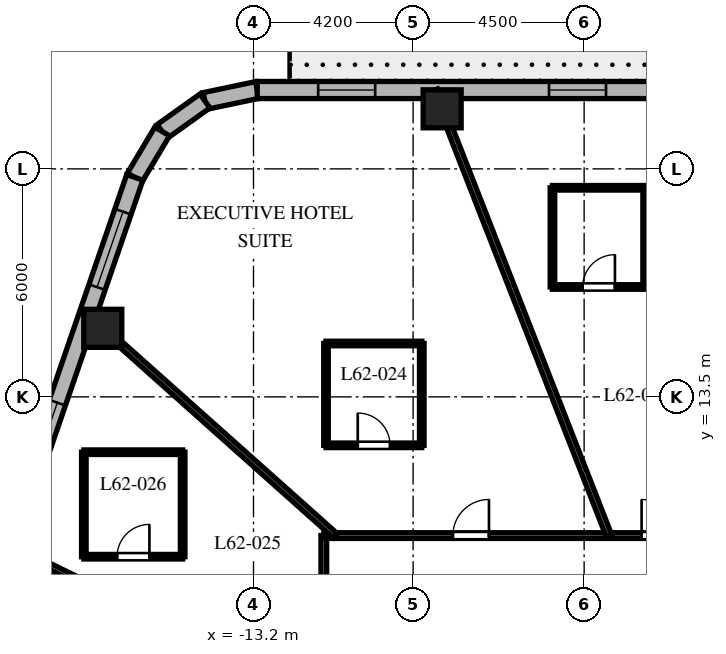
"""IFC4 building model, lengths in metres.
Left out: names, types, materials, properties, quantities, classifications, styles, units other than length and angle.
Written with IfcOpenShell. Run it as: python <this file> out.ifc"""

import sys

from ifc_helpers import new_model, si_unit, direction, frame, frame_2d, origin, origin_2d, place, context, subcontext, project, spatial, rectangle, extrude, element, fill, save


model = new_model("IFC4")
c1 = context("Model", 3, precision=1e-05, world=origin(), true_north=direction((0.0, 1.0)))
c2 = subcontext(c1, "Body", "Model", "MODEL_VIEW")
j1 = project(units=[si_unit("LENGTHUNIT", "METRE"), si_unit("PLANEANGLEUNIT", "RADIAN")], contexts=[c1])
p1 = place(None, origin())
s1 = spatial("IfcSite", under=j1, at=p1, CompositionType="ELEMENT")
p2 = place(p1, origin())
s2 = spatial("IfcBuilding", under=s1, at=p2, CompositionType="ELEMENT")
p3 = place(p2, frame((0.0, 0.0, 248.3)))
s3 = spatial("IfcBuildingStorey", under=s2, at=p3, CompositionType="ELEMENT", Elevation=248.3)
for number, where, z_axis, x_axis in (
    (1, (-8.236, 21.08, 0.0), (0.0, 0.0, 1.0), (1.0, 0.0, 0.0)),
    (2, (-17.166, 15.304, 0.0), (0.0, 0.0, 1.0), (1.0, 0.0, 0.0)),
):
    element("IfcColumn", number, at=place(p3, frame(where, z_axis=z_axis, x_axis=x_axis)), inside=s3, PredefinedType="COLUMN", context=c2, shape_type="SweptSolid", body=[
        extrude(rectangle(XDim=1.0, YDim=1.0, at=origin_2d()), origin(), (0.0, 0.0, 1.0), 3.8),
    ])
p4 = place(p3, frame((-13.102, 21.575, 0.0), z_axis=(0.0, 0.0, 1.0), x_axis=(-0.978757421505, -0.205021730188, 0.0)))
e3 = element("IfcWall", 3, at=p4, inside=s3, PredefinedType="SOLIDWALL", context=c2, shape_type="SweptSolid", body=[
    extrude(rectangle(XDim=1.406, YDim=0.45, at=frame_2d((0.703, 0.0))), origin(), (0.0, 0.0, 1.0), 3.5),
])
p5 = place(p3, frame((-14.478, 21.287, 0.0), z_axis=(0.0, 0.0, 1.0), x_axis=(-0.813888518617, -0.58102106611, 0.0)))
e4 = element("IfcWall", 4, at=p5, inside=s3, PredefinedType="SOLIDWALL", context=c2, shape_type="SweptSolid", body=[
    extrude(rectangle(XDim=1.383, YDim=0.45, at=frame_2d((0.691, 0.0))), origin(), (0.0, 0.0, 1.0), 3.5),
])
p6 = place(p3, frame((-15.604, 20.483, 0.0), z_axis=(0.0, 0.0, 1.0), x_axis=(-0.512222149036, -0.858852996756, 0.0)))
e5 = element("IfcWall", 5, at=p6, inside=s3, PredefinedType="SOLIDWALL", context=c2, shape_type="SweptSolid", body=[
    extrude(rectangle(XDim=1.406, YDim=0.45, at=frame_2d((0.703, 0.0))), origin(), (0.0, 0.0, 1.0), 3.5),
])
p7 = place(p3, frame((11.298, 21.575, 0.0), z_axis=(0.0, 0.0, 1.0), x_axis=(-1.0, 0.0, 0.0)))
e6 = element("IfcWall", 6, at=p7, inside=s3, PredefinedType="SOLIDWALL", context=c2, shape_type="SweptSolid", body=[
    extrude(rectangle(XDim=24.399, YDim=0.45, at=frame_2d((12.2, 0.0))), origin(), (0.0, 0.0, 1.0), 3.5),
])
p8 = place(p7, frame((2.55, 0.0, 0.0)))
e7 = element("IfcOpeningElement", 7, at=p8, cuts=e6, PredefinedType="OPENING", context=c2, shape_type="SweptSolid", body=[
    extrude(rectangle(XDim=0.95, YDim=2.15, at=frame_2d((0.475, 1.075))), frame((0.0, 0.235, 0.0), z_axis=(0.0, -1.0, 0.0), x_axis=(1.0, 0.0, 0.0)), (0.0, 0.0, 1.0), 0.47),
])
p9 = place(p7, frame((8.469, 0.0, 0.8)))
e8 = element("IfcOpeningElement", 8, at=p9, cuts=e6, PredefinedType="OPENING", context=c2, shape_type="SweptSolid", body=[
    extrude(rectangle(XDim=1.5, YDim=1.8, at=frame_2d((0.75, 0.9))), frame((0.0, 0.235, 0.0), z_axis=(0.0, -1.0, 0.0), x_axis=(1.0, 0.0, 0.0)), (0.0, 0.0, 1.0), 0.47),
])
p10 = place(p7, frame((15.222, 0.0, 0.8)))
e9 = element("IfcOpeningElement", 9, at=p10, cuts=e6, PredefinedType="OPENING", context=c2, shape_type="SweptSolid", body=[
    extrude(rectangle(XDim=1.5, YDim=1.8, at=frame_2d((0.75, 0.9))), frame((0.0, 0.235, 0.0), z_axis=(0.0, -1.0, 0.0), x_axis=(1.0, 0.0, 0.0)), (0.0, 0.0, 1.0), 0.47),
])
p11 = place(p7, frame((21.296, 0.0, 0.8)))
e10 = element("IfcOpeningElement", 10, at=p11, cuts=e6, PredefinedType="OPENING", context=c2, shape_type="SweptSolid", body=[
    extrude(rectangle(XDim=1.5, YDim=1.8, at=frame_2d((0.75, 0.9))), frame((0.0, 0.235, 0.0), z_axis=(0.0, -1.0, 0.0), x_axis=(1.0, 0.0, 0.0)), (0.0, 0.0, 1.0), 0.47),
])
p12 = place(p3, frame((-16.324, 19.275, 0.0), z_axis=(0.0, 0.0, 1.0), x_axis=(-0.325083142304, -0.945685439557, 0.0)))
e11 = element("IfcWall", 11, at=p12, inside=s3, PredefinedType="SOLIDWALL", context=c2, shape_type="SweptSolid", body=[
    extrude(rectangle(XDim=20.224, YDim=0.45, at=frame_2d((10.112, 0.0))), origin(), (0.0, 0.0, 1.0), 3.5),
])
p13 = place(p12, frame((0.953, 0.0, 0.8)))
e12 = element("IfcOpeningElement", 12, at=p13, cuts=e11, PredefinedType="OPENING", context=c2, shape_type="SweptSolid", body=[
    extrude(rectangle(XDim=2.1, YDim=1.85, at=frame_2d((1.05, 0.925))), frame((0.0, 0.235, 0.0), z_axis=(0.0, -1.0, 0.0), x_axis=(1.0, 0.0, 0.0)), (0.0, 0.0, 1.0), 0.47),
])
p14 = place(p12, frame((6.268, 0.0, 0.8)))
e13 = element("IfcOpeningElement", 13, at=p14, cuts=e11, PredefinedType="OPENING", context=c2, shape_type="SweptSolid", body=[
    extrude(rectangle(XDim=2.1, YDim=1.85, at=frame_2d((1.05, 0.925))), frame((0.0, 0.235, 0.0), z_axis=(0.0, -1.0, 0.0), x_axis=(1.0, 0.0, 0.0)), (0.0, 0.0, 1.0), 0.47),
])
p15 = place(p12, frame((11.95, 0.0, 0.8)))
e14 = element("IfcOpeningElement", 14, at=p15, cuts=e11, PredefinedType="OPENING", context=c2, shape_type="SweptSolid", body=[
    extrude(rectangle(XDim=2.1, YDim=1.85, at=frame_2d((1.05, 0.925))), frame((0.0, 0.235, 0.0), z_axis=(0.0, -1.0, 0.0), x_axis=(1.0, 0.0, 0.0)), (0.0, 0.0, 1.0), 0.47),
])
p16 = place(p12, frame((17.118, 0.0, 0.8)))
e15 = element("IfcOpeningElement", 15, at=p16, cuts=e11, PredefinedType="OPENING", context=c2, shape_type="SweptSolid", body=[
    extrude(rectangle(XDim=2.1, YDim=1.85, at=frame_2d((1.05, 0.925))), frame((0.0, 0.235, 0.0), z_axis=(0.0, -1.0, 0.0), x_axis=(1.0, 0.0, 0.0)), (0.0, 0.0, 1.0), 0.47),
])
p17 = place(p3, frame((-11.35, 4.4, 0.0), z_axis=(0.0, 0.0, 1.0), x_axis=(0.0, 1.0, 0.0)))
e16 = element("IfcWall", 16, at=p17, inside=s3, PredefinedType="PARTITIONING", context=c2, shape_type="SweptSolid", body=[
    extrude(rectangle(XDim=5.45, YDim=0.15, at=frame_2d((2.725, 0.0))), origin(), (0.0, 0.0, 1.0), 2.99),
])
p18 = place(p17, frame((2.694, 0.0, 0.0)))
e17 = element("IfcOpeningElement", 17, at=p18, cuts=e16, PredefinedType="OPENING", context=c2, shape_type="SweptSolid", body=[
    extrude(rectangle(XDim=0.95, YDim=2.03, at=frame_2d((0.475, 1.015))), frame((0.0, 0.085, 0.0), z_axis=(0.0, -1.0, 0.0), x_axis=(1.0, 0.0, 0.0)), (0.0, 0.0, 1.0), 0.17),
])
p19 = place(p3, frame((-11.35, 9.85, 0.0), z_axis=(0.0, 0.0, 1.0), x_axis=(1.0, 0.0, 0.0)))
e18 = element("IfcWall", 18, at=p19, inside=s3, PredefinedType="PARTITIONING", context=c2, shape_type="SweptSolid", body=[
    extrude(rectangle(XDim=10.43, YDim=0.15, at=frame_2d((5.215, 0.0))), origin(), (0.0, 0.0, 1.0), 2.99),
])
p20 = place(p19, frame((8.362, 0.0, 0.0)))
e19 = element("IfcOpeningElement", 19, at=p20, cuts=e18, PredefinedType="OPENING", context=c2, shape_type="SweptSolid", body=[
    extrude(rectangle(XDim=0.95, YDim=2.03, at=frame_2d((0.475, 1.015))), frame((0.0, 0.085, 0.0), z_axis=(0.0, -1.0, 0.0), x_axis=(1.0, 0.0, 0.0)), (0.0, 0.0, 1.0), 0.17),
])
p21 = place(p19, frame((3.396, 0.0, 0.0)))
e20 = element("IfcOpeningElement", 20, at=p21, cuts=e18, PredefinedType="OPENING", context=c2, shape_type="SweptSolid", body=[
    extrude(rectangle(XDim=0.95, YDim=2.03, at=frame_2d((0.475, 1.015))), frame((0.0, 0.085, 0.0), z_axis=(0.0, -1.0, 0.0), x_axis=(1.0, 0.0, 0.0)), (0.0, 0.0, 1.0), 0.17),
])
p22 = place(p3, frame((-3.848, 9.85, 0.0), z_axis=(0.0, 0.0, 1.0), x_axis=(-0.363921778212, 0.931429513889, 0.0)))
e21 = element("IfcWall", 21, at=p22, inside=s3, PredefinedType="PARTITIONING", context=c2, shape_type="SweptSolid", body=[
    extrude(rectangle(XDim=12.588, YDim=0.15, at=frame_2d((6.294, 0.0))), origin(), (0.0, 0.0, 1.0), 2.74),
])
p23 = place(p3, frame((-11.048, 9.85, 0.0), z_axis=(0.0, 0.0, 1.0), x_axis=(-0.746444434655, 0.665447748492, 0.0)))
e22 = element("IfcWall", 22, at=p23, inside=s3, PredefinedType="PARTITIONING", context=c2, shape_type="SweptSolid", body=[
    extrude(rectangle(XDim=8.732, YDim=0.15, at=frame_2d((4.366, 0.0))), origin(), (0.0, 0.0, 1.0), 2.74),
])
p24 = place(p3, frame((-11.35, 5.528, 0.0), z_axis=(0.0, 0.0, 1.0), x_axis=(-0.899038669565, 0.437869239188, 0.0)))
e23 = element("IfcWall", 23, at=p24, inside=s3, PredefinedType="PARTITIONING", context=c2, shape_type="SweptSolid", body=[
    extrude(rectangle(XDim=9.242, YDim=0.15, at=frame_2d((4.621, 0.0))), origin(), (0.0, 0.0, 1.0), 2.74),
])
p25 = place(p3, frame((-5.334, 16.392, 0.0), z_axis=(0.0, 0.0, 1.0), x_axis=(1.0, 0.0, 0.0)))
e24 = element("IfcWall", 24, at=p25, inside=s3, PredefinedType="PARTITIONING", context=c2, shape_type="SweptSolid", body=[
    extrude(rectangle(XDim=2.44, YDim=0.12, at=frame_2d((1.22, 0.0))), origin(), (0.0, 0.0, 1.0), 3.5),
])
p26 = place(p25, frame((0.795, 0.0, 0.0)))
e25 = element("IfcOpeningElement", 25, at=p26, cuts=e24, PredefinedType="OPENING", context=c2, shape_type="SweptSolid", body=[
    extrude(rectangle(XDim=0.85, YDim=2.03, at=frame_2d((0.425, 1.015))), frame((0.0, 0.07, 0.0), z_axis=(0.0, -1.0, 0.0), x_axis=(1.0, 0.0, 0.0)), (0.0, 0.0, 1.0), 0.14),
])
p27 = place(p3, frame((-2.894, 16.392, 0.0), z_axis=(0.0, 0.0, 1.0), x_axis=(0.0, 1.0, 0.0)))
e26 = element("IfcWall", 26, at=p27, inside=s3, PredefinedType="PARTITIONING", context=c2, shape_type="SweptSolid", body=[
    extrude(rectangle(XDim=2.61, YDim=0.12, at=frame_2d((1.305, 0.0))), origin(), (0.0, 0.0, 1.0), 2.94),
])
p28 = place(p3, frame((-2.894, 19.002, 0.0), z_axis=(0.0, 0.0, 1.0), x_axis=(-1.0, 0.0, 0.0)))
e27 = element("IfcWall", 27, at=p28, inside=s3, PredefinedType="PARTITIONING", context=c2, shape_type="SweptSolid", body=[
    extrude(rectangle(XDim=2.44, YDim=0.12, at=frame_2d((1.22, 0.0))), origin(), (0.0, 0.0, 1.0), 3.5),
])
p29 = place(p3, frame((-5.334, 19.002, 0.0), z_axis=(0.0, 0.0, 1.0), x_axis=(0.0, -1.0, 0.0)))
e28 = element("IfcWall", 28, at=p29, inside=s3, PredefinedType="PARTITIONING", context=c2, shape_type="SweptSolid", body=[
    extrude(rectangle(XDim=2.61, YDim=0.12, at=frame_2d((1.305, 0.0))), origin(), (0.0, 0.0, 1.0), 2.94),
])
p30 = place(p3, frame((-11.292, 12.225, 0.0), z_axis=(0.0, 0.0, 1.0), x_axis=(1.0, 0.0, 0.0)))
e29 = element("IfcWall", 29, at=p30, inside=s3, PredefinedType="PARTITIONING", context=c2, shape_type="SweptSolid", body=[
    extrude(rectangle(XDim=2.52, YDim=0.12, at=frame_2d((1.26, 0.0))), origin(), (0.0, 0.0, 1.0), 2.99),
])
p31 = place(p30, frame((0.835, 0.0, 0.0)))
e30 = element("IfcOpeningElement", 30, at=p31, cuts=e29, PredefinedType="OPENING", context=c2, shape_type="SweptSolid", body=[
    extrude(rectangle(XDim=0.85, YDim=2.03, at=frame_2d((0.425, 1.015))), frame((0.0, 0.07, 0.0), z_axis=(0.0, -1.0, 0.0), x_axis=(1.0, 0.0, 0.0)), (0.0, 0.0, 1.0), 0.14),
])
p32 = place(p3, frame((-8.772, 12.225, 0.0), z_axis=(0.0, 0.0, 1.0), x_axis=(0.0, 1.0, 0.0)))
e31 = element("IfcWall", 31, at=p32, inside=s3, PredefinedType="PARTITIONING", context=c2, shape_type="SweptSolid", body=[
    extrude(rectangle(XDim=2.68, YDim=0.12, at=frame_2d((1.34, 0.0))), origin(), (0.0, 0.0, 1.0), 2.99),
])
p33 = place(p3, frame((-8.772, 14.905, 0.0), z_axis=(0.0, 0.0, 1.0), x_axis=(-1.0, 0.0, 0.0)))
e32 = element("IfcWall", 32, at=p33, inside=s3, PredefinedType="PARTITIONING", context=c2, shape_type="SweptSolid", body=[
    extrude(rectangle(XDim=2.52, YDim=0.12, at=frame_2d((1.26, 0.0))), origin(), (0.0, 0.0, 1.0), 3.026),
])
p34 = place(p3, frame((-11.292, 14.905, 0.0), z_axis=(0.0, 0.0, 1.0), x_axis=(0.0, -1.0, 0.0)))
e33 = element("IfcWall", 33, at=p34, inside=s3, PredefinedType="PARTITIONING", context=c2, shape_type="SweptSolid", body=[
    extrude(rectangle(XDim=2.68, YDim=0.12, at=frame_2d((1.34, 0.0))), origin(), (0.0, 0.0, 1.0), 3.026),
])
p35 = place(p3, frame((-17.664, 9.294, 0.0), z_axis=(0.0, 0.0, 1.0), x_axis=(1.0, 0.0, 0.0)))
e34 = element("IfcWall", 34, at=p35, inside=s3, PredefinedType="PARTITIONING", context=c2, shape_type="SweptSolid", body=[
    extrude(rectangle(XDim=2.6, YDim=0.12, at=frame_2d((1.3, 0.0))), origin(), (0.0, 0.0, 1.0), 3.072),
])
p36 = place(p35, frame((0.875, 0.0, 0.0)))
e35 = element("IfcOpeningElement", 35, at=p36, cuts=e34, PredefinedType="OPENING", context=c2, shape_type="SweptSolid", body=[
    extrude(rectangle(XDim=0.85, YDim=2.03, at=frame_2d((0.425, 1.015))), frame((0.0, 0.07, 0.0), z_axis=(0.0, -1.0, 0.0), x_axis=(1.0, 0.0, 0.0)), (0.0, 0.0, 1.0), 0.14),
])
p37 = place(p3, frame((-15.064, 9.294, 0.0), z_axis=(0.0, 0.0, 1.0), x_axis=(0.0, 1.0, 0.0)))
e36 = element("IfcWall", 36, at=p37, inside=s3, PredefinedType="PARTITIONING", context=c2, shape_type="SweptSolid", body=[
    extrude(rectangle(XDim=2.75, YDim=0.12, at=frame_2d((1.375, 0.0))), origin(), (0.0, 0.0, 1.0), 3.072),
])
p38 = place(p3, frame((-15.064, 12.044, 0.0), z_axis=(0.0, 0.0, 1.0), x_axis=(-1.0, 0.0, 0.0)))
e37 = element("IfcWall", 37, at=p38, inside=s3, PredefinedType="PARTITIONING", context=c2, shape_type="SweptSolid", body=[
    extrude(rectangle(XDim=2.6, YDim=0.12, at=frame_2d((1.3, 0.0))), origin(), (0.0, 0.0, 1.0), 3.5),
])
p39 = place(p3, frame((-17.664, 12.044, 0.0), z_axis=(0.0, 0.0, 1.0), x_axis=(0.0, -1.0, 0.0)))
e38 = element("IfcWall", 38, at=p39, inside=s3, PredefinedType="PARTITIONING", context=c2, shape_type="SweptSolid", body=[
    extrude(rectangle(XDim=2.75, YDim=0.12, at=frame_2d((1.375, 0.0))), origin(), (0.0, 0.0, 1.0), 3.5),
])
p40 = place(p10, origin())
e39 = element("IfcWindow", 39, at=p40, inside=s3, PartitioningType="SINGLE_PANEL", PredefinedType="WINDOW", context=c2, shape_type="SweptSolid", body=[
    extrude(rectangle(XDim=1.5, YDim=1.8, at=frame_2d((0.75, 0.9))), frame((0.0, 0.03, 0.0), z_axis=(0.0, -1.0, 0.0), x_axis=(1.0, 0.0, 0.0)), (0.0, 0.0, 1.0), 0.06),
])
fill(e9, e39)
p41 = place(p11, origin())
e40 = element("IfcWindow", 40, at=p41, inside=s3, PartitioningType="SINGLE_PANEL", PredefinedType="WINDOW", context=c2, shape_type="SweptSolid", body=[
    extrude(rectangle(XDim=1.5, YDim=1.8, at=frame_2d((0.75, 0.9))), frame((0.0, 0.03, 0.0), z_axis=(0.0, -1.0, 0.0), x_axis=(1.0, 0.0, 0.0)), (0.0, 0.0, 1.0), 0.06),
])
fill(e10, e40)
p42 = place(p13, origin())
e41 = element("IfcWindow", 41, at=p42, inside=s3, PartitioningType="SINGLE_PANEL", PredefinedType="WINDOW", context=c2, shape_type="SweptSolid", body=[
    extrude(rectangle(XDim=2.1, YDim=1.85, at=frame_2d((1.05, 0.925))), frame((0.0, 0.03, 0.0), z_axis=(0.0, -1.0, 0.0), x_axis=(1.0, 0.0, 0.0)), (0.0, 0.0, 1.0), 0.06),
])
fill(e12, e41)
p43 = place(p14, origin())
e42 = element("IfcWindow", 42, at=p43, inside=s3, PartitioningType="SINGLE_PANEL", PredefinedType="WINDOW", context=c2, shape_type="SweptSolid", body=[
    extrude(rectangle(XDim=2.1, YDim=1.85, at=frame_2d((1.05, 0.925))), frame((0.0, 0.03, 0.0), z_axis=(0.0, -1.0, 0.0), x_axis=(1.0, 0.0, 0.0)), (0.0, 0.0, 1.0), 0.06),
])
fill(e13, e42)
p44 = place(p20, origin())
e43 = element("IfcDoor", 43, at=p44, inside=s3, OperationType="SINGLE_SWING_LEFT", PredefinedType="DOOR", context=c2, shape_type="SweptSolid", body=[
    extrude(rectangle(XDim=0.95, YDim=2.03, at=frame_2d((0.475, 1.015))), frame((0.0, 0.025, 0.0), z_axis=(0.0, -1.0, 0.0), x_axis=(1.0, 0.0, 0.0)), (0.0, 0.0, 1.0), 0.05),
])
fill(e19, e43)
p45 = place(p26, origin())
e44 = element("IfcDoor", 44, at=p45, inside=s3, OperationType="SINGLE_SWING_RIGHT", PredefinedType="DOOR", context=c2, shape_type="SweptSolid", body=[
    extrude(rectangle(XDim=0.85, YDim=2.03, at=frame_2d((0.425, 1.015))), frame((0.0, 0.025, 0.0), z_axis=(0.0, -1.0, 0.0), x_axis=(1.0, 0.0, 0.0)), (0.0, 0.0, 1.0), 0.05),
])
fill(e25, e44)
p46 = place(p21, origin())
e45 = element("IfcDoor", 45, at=p46, inside=s3, OperationType="SINGLE_SWING_RIGHT", PredefinedType="DOOR", context=c2, shape_type="SweptSolid", body=[
    extrude(rectangle(XDim=0.95, YDim=2.03, at=frame_2d((0.475, 1.015))), frame((0.0, 0.025, 0.0), z_axis=(0.0, -1.0, 0.0), x_axis=(1.0, 0.0, 0.0)), (0.0, 0.0, 1.0), 0.05),
])
fill(e20, e45)
p47 = place(p31, origin())
e46 = element("IfcDoor", 46, at=p47, inside=s3, OperationType="SINGLE_SWING_LEFT", PredefinedType="DOOR", context=c2, shape_type="SweptSolid", body=[
    extrude(rectangle(XDim=0.85, YDim=2.03, at=frame_2d((0.425, 1.015))), frame((0.0, 0.025, 0.0), z_axis=(0.0, -1.0, 0.0), x_axis=(1.0, 0.0, 0.0)), (0.0, 0.0, 1.0), 0.05),
])
fill(e30, e46)
p48 = place(p36, origin())
e47 = element("IfcDoor", 47, at=p48, inside=s3, OperationType="SINGLE_SWING_RIGHT", PredefinedType="DOOR", context=c2, shape_type="SweptSolid", body=[
    extrude(rectangle(XDim=0.85, YDim=2.03, at=frame_2d((0.425, 1.015))), frame((0.0, 0.025, 0.0), z_axis=(0.0, -1.0, 0.0), x_axis=(1.0, 0.0, 0.0)), (0.0, 0.0, 1.0), 0.05),
])
fill(e35, e47)
save(model, sys.argv[1])
